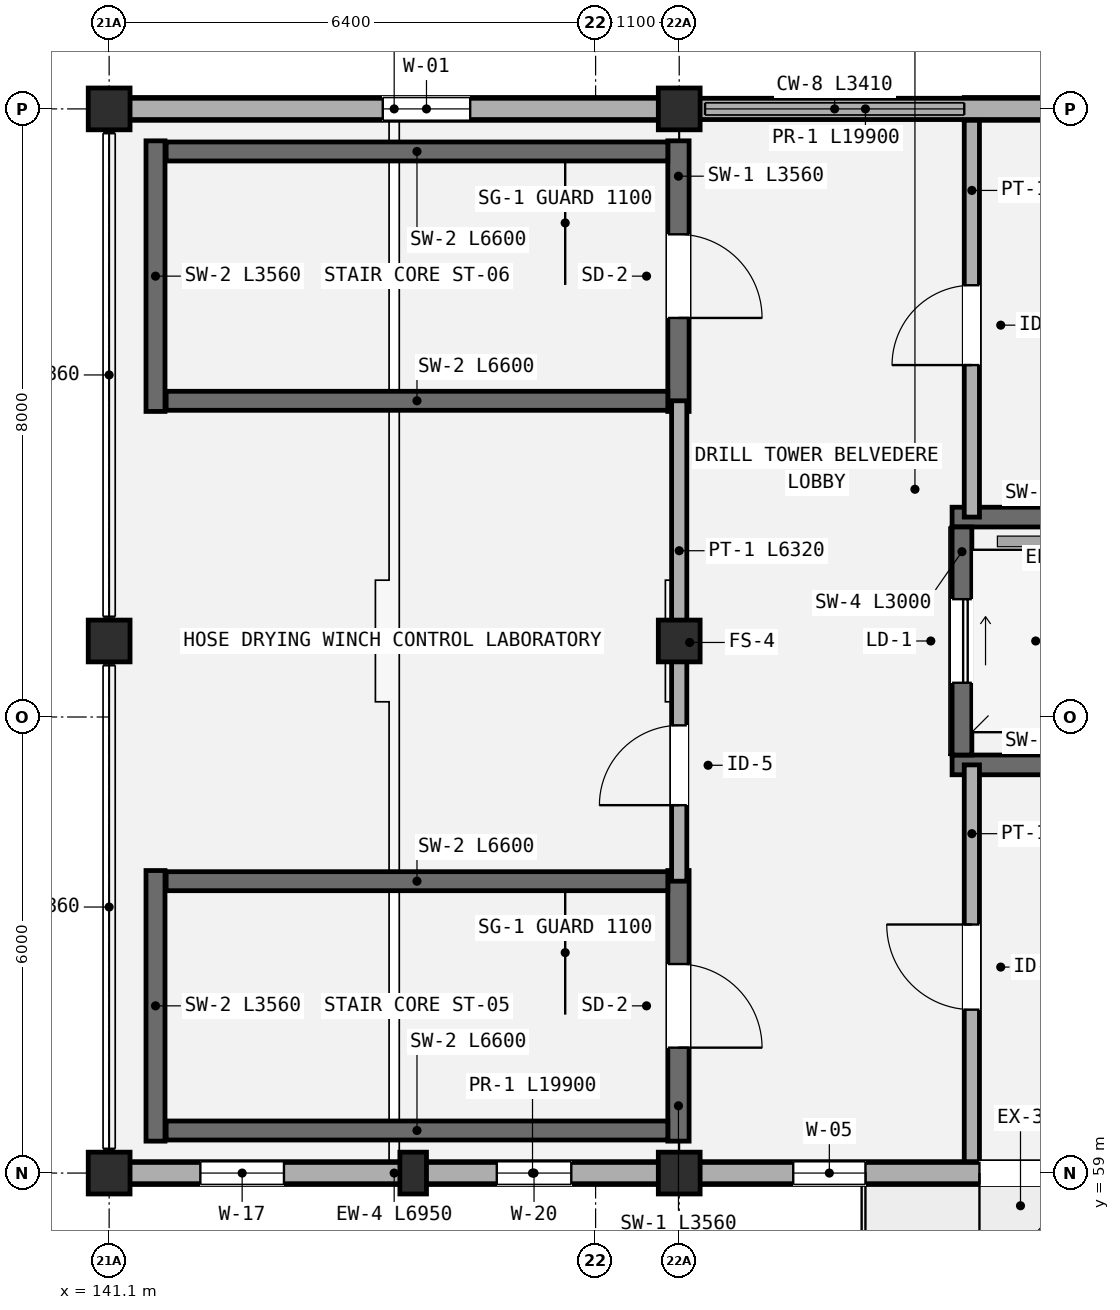
"""IFC4 building model, lengths in metres.
Left out: names, types, materials, properties, quantities, classifications, styles, units other than length and angle.
Written with IfcOpenShell. Run it as: python <this file> out.ifc"""

import sys

from ifc_helpers import new_model, si_unit, direction, frame, frame_2d, origin, origin_2d, place, context, subcontext, project, spatial, polyline, rectangle, outline, extrude, element, fill, save


model = new_model("IFC4")
c1 = context("Model", 3, precision=1e-05, world=origin(), true_north=direction((0.0, 1.0)))
c2 = subcontext(c1, "Body", "Model", "MODEL_VIEW")
j1 = project(units=[si_unit("LENGTHUNIT", "METRE"), si_unit("PLANEANGLEUNIT", "RADIAN")], contexts=[c1])
p1 = place(None, origin())
s1 = spatial("IfcSite", under=j1, at=p1, CompositionType="ELEMENT")
p2 = place(p1, origin())
s2 = spatial("IfcBuilding", under=s1, at=p2, CompositionType="ELEMENT")
p3 = place(p2, frame((0.0, 0.0, 22.05)))
s3 = spatial("IfcBuildingStorey", under=s2, at=p3, CompositionType="ELEMENT", Elevation=22.05)
for number, where, z_axis, x_axis in (
    (1, (141.1, 59.0, 0.0), (0.0, 0.0, 1.0), (1.0, 0.0, 0.0)),
    (2, (141.1, 66.0, 0.0), (0.0, 0.0, 1.0), (1.0, 0.0, 0.0)),
    (3, (141.1, 73.0, 0.0), (0.0, 0.0, 1.0), (1.0, 0.0, 0.0)),
    (4, (148.6, 59.0, 0.0), (0.0, 0.0, 1.0), (1.0, 0.0, 0.0)),
    (5, (148.6, 66.0, 0.0), (0.0, 0.0, 1.0), (1.0, 0.0, 0.0)),
    (6, (148.6, 73.0, 0.0), (0.0, 0.0, 1.0), (1.0, 0.0, 0.0)),
):
    element("IfcColumn", number, at=place(p3, frame(where, z_axis=z_axis, x_axis=x_axis)), inside=s3, PredefinedType="COLUMN", context=c2, shape_type="SweptSolid", body=[
        extrude(rectangle(XDim=0.55, YDim=0.55, at=origin_2d()), origin(), (0.0, 0.0, 1.0), 4.05),
    ])
p4 = place(p3, frame((145.1, 59.0, 0.0), z_axis=(0.0, 0.0, 1.0), x_axis=(1.0, 0.0, 0.0)))
e7 = element("IfcColumn", 7, at=p4, inside=s3, PredefinedType="PILASTER", context=c2, shape_type="SweptSolid", body=[
    extrude(rectangle(XDim=0.35, YDim=0.55, at=origin_2d()), origin(), (0.0, 0.0, 1.0), 4.05),
])
p5 = place(p3, frame((141.375, 59.0, 0.0), z_axis=(0.0, 0.0, 1.0), x_axis=(1.0, 0.0, 0.0)))
e8 = element("IfcWall", 8, at=p5, inside=s3, PredefinedType="STANDARD", context=c2, shape_type="SweptSolid", body=[
    extrude(rectangle(XDim=6.95, YDim=0.3, at=frame_2d((3.475, 0.0))), origin(), (0.0, 0.0, 1.0), 3.35),
])
p6 = place(p5, frame((0.925, 0.0, 0.75)))
e9 = element("IfcOpeningElement", 9, at=p6, cuts=e8, PredefinedType="OPENING", context=c2, shape_type="SweptSolid", body=[
    extrude(rectangle(XDim=1.1, YDim=1.35, at=frame_2d((0.55, 0.675))), frame((0.0, 0.16, 0.0), z_axis=(0.0, -1.0, 0.0), x_axis=(1.0, 0.0, 0.0)), (0.0, 0.0, 1.0), 0.32),
])
p7 = place(p5, frame((4.825, 0.0, 0.75)))
e10 = element("IfcOpeningElement", 10, at=p7, cuts=e8, PredefinedType="OPENING", context=c2, shape_type="SweptSolid", body=[
    extrude(rectangle(XDim=0.98, YDim=1.45, at=frame_2d((0.49, 0.725))), frame((0.0, 0.16, 0.0), z_axis=(0.0, -1.0, 0.0), x_axis=(1.0, 0.0, 0.0)), (0.0, 0.0, 1.0), 0.32),
])
p8 = place(p3, frame((148.875, 59.0, 0.0), z_axis=(0.0, 0.0, 1.0), x_axis=(1.0, 0.0, 0.0)))
e11 = element("IfcWall", 11, at=p8, inside=s3, PredefinedType="STANDARD", context=c2, shape_type="SweptSolid", body=[
    extrude(rectangle(XDim=11.85, YDim=0.3, at=frame_2d((5.925, 0.0))), origin(), (0.0, 0.0, 1.0), 3.35),
])
p9 = place(p8, frame((3.675, 0.0, 0.0)))
e12 = element("IfcOpeningElement", 12, at=p9, cuts=e11, PredefinedType="OPENING", context=c2, shape_type="SweptSolid", body=[
    extrude(rectangle(XDim=1.08, YDim=2.1, at=frame_2d((0.54, 1.05))), frame((0.0, 0.16, 0.0), z_axis=(0.0, -1.0, 0.0), x_axis=(1.0, 0.0, 0.0)), (0.0, 0.0, 1.0), 0.32),
])
p10 = place(p8, frame((1.225, 0.0, 0.75)))
e13 = element("IfcOpeningElement", 13, at=p10, cuts=e11, PredefinedType="OPENING", context=c2, shape_type="SweptSolid", body=[
    extrude(rectangle(XDim=0.95, YDim=1.35, at=frame_2d((0.475, 0.675))), frame((0.0, 0.16, 0.0), z_axis=(0.0, -1.0, 0.0), x_axis=(1.0, 0.0, 0.0)), (0.0, 0.0, 1.0), 0.32),
])
p11 = place(p8, frame((6.825, 0.0, 0.75)))
e14 = element("IfcOpeningElement", 14, at=p11, cuts=e11, PredefinedType="OPENING", context=c2, shape_type="SweptSolid", body=[
    extrude(rectangle(XDim=0.95, YDim=1.35, at=frame_2d((0.475, 0.675))), frame((0.0, 0.16, 0.0), z_axis=(0.0, -1.0, 0.0), x_axis=(1.0, 0.0, 0.0)), (0.0, 0.0, 1.0), 0.32),
])
p12 = place(p3, frame((160.725, 73.0, 0.0), z_axis=(0.0, 0.0, 1.0), x_axis=(-1.0, 0.0, 0.0)))
e15 = element("IfcWall", 15, at=p12, inside=s3, PredefinedType="STANDARD", context=c2, shape_type="SweptSolid", body=[
    extrude(rectangle(XDim=8.375, YDim=0.3, at=frame_2d((4.188, 0.0))), origin(), (0.0, 0.0, 1.0), 3.35),
])
p13 = place(p12, frame((1.375, 0.0, 0.75)))
e16 = element("IfcOpeningElement", 16, at=p13, cuts=e15, PredefinedType="OPENING", context=c2, shape_type="SweptSolid", body=[
    extrude(rectangle(XDim=0.88, YDim=1.5, at=frame_2d((0.44, 0.75))), frame((0.0, 0.16, 0.0), z_axis=(0.0, -1.0, 0.0), x_axis=(1.0, 0.0, 0.0)), (0.0, 0.0, 1.0), 0.32),
])
p14 = place(p12, frame((4.975, 0.0, 0.75)))
e17 = element("IfcOpeningElement", 17, at=p14, cuts=e15, PredefinedType="OPENING", context=c2, shape_type="SweptSolid", body=[
    extrude(rectangle(XDim=0.88, YDim=1.5, at=frame_2d((0.44, 0.75))), frame((0.0, 0.16, 0.0), z_axis=(0.0, -1.0, 0.0), x_axis=(1.0, 0.0, 0.0)), (0.0, 0.0, 1.0), 0.32),
])
p15 = place(p3, frame((148.325, 73.0, 0.0), z_axis=(0.0, 0.0, 1.0), x_axis=(-1.0, 0.0, 0.0)))
e18 = element("IfcWall", 18, at=p15, inside=s3, PredefinedType="STANDARD", context=c2, shape_type="SweptSolid", body=[
    extrude(rectangle(XDim=6.95, YDim=0.3, at=frame_2d((3.475, 0.0))), origin(), (0.0, 0.0, 1.0), 3.35),
])
p16 = place(p15, frame((2.475, 0.0, 0.75)))
e19 = element("IfcOpeningElement", 19, at=p16, cuts=e18, PredefinedType="OPENING", context=c2, shape_type="SweptSolid", body=[
    extrude(rectangle(XDim=1.15, YDim=1.45, at=frame_2d((0.575, 0.725))), frame((0.0, 0.16, 0.0), z_axis=(0.0, -1.0, 0.0), x_axis=(1.0, 0.0, 0.0)), (0.0, 0.0, 1.0), 0.32),
])
p17 = place(p3, frame((141.1, 59.0, 4.05), z_axis=(0.0, 0.0, 1.0), x_axis=(1.0, 0.0, 0.0)))
e20 = element("IfcWall", 20, at=p17, inside=s3, PredefinedType="PARAPET", context=c2, shape_type="SweptSolid", body=[
    extrude(outline(polyline([(0.0, 0.0), (7.5, 0.0), (7.5, 0.8), (6.668, 0.8), (6.667, 0.938), (5.834, 0.938), (5.833, 1.075), (5.001, 1.075), (5.0, 1.212), (4.168, 1.212), (4.167, 1.35), (3.334, 1.35), (3.333, 1.212), (2.501, 1.212), (2.5, 1.075), (1.668, 1.075), (1.667, 0.938), (0.834, 0.938), (0.833, 0.8), (0.0, 0.8), (0.0, 0.0)])), frame((0.0, 0.14, 0.0), z_axis=(0.0, -1.0, 0.0), x_axis=(1.0, 0.0, 0.0)), (0.0, 0.0, 1.0), 0.28),
])
p18 = place(p3, frame((148.6, 59.0, 4.05), z_axis=(0.0, 0.0, 1.0), x_axis=(1.0, 0.0, 0.0)))
e21 = element("IfcWall", 21, at=p18, inside=s3, PredefinedType="PARAPET", context=c2, shape_type="SweptSolid", body=[
    extrude(outline(polyline([(0.0, 0.0), (12.4, 0.0), (12.4, 0.8), (11.023, 0.8), (11.022, 0.987), (9.646, 0.987), (9.644, 1.175), (8.268, 1.175), (8.267, 1.362), (6.89, 1.362), (6.889, 1.55), (5.512, 1.55), (5.511, 1.362), (4.134, 1.362), (4.133, 1.175), (2.757, 1.175), (2.756, 0.987), (1.379, 0.987), (1.378, 0.8), (0.0, 0.8), (0.0, 0.0)])), frame((0.0, 0.14, 0.0), z_axis=(0.0, -1.0, 0.0), x_axis=(1.0, 0.0, 0.0)), (0.0, 0.0, 1.0), 0.28),
])
p19 = place(p3, frame((141.1, 73.0, 4.05), z_axis=(0.0, 0.0, 1.0), x_axis=(1.0, 0.0, 0.0)))
e22 = element("IfcWall", 22, at=p19, inside=s3, PredefinedType="PARAPET", context=c2, shape_type="SweptSolid", body=[
    extrude(outline(polyline([(0.0, 0.0), (7.5, 0.0), (7.5, 0.8), (6.668, 0.8), (6.667, 0.938), (5.834, 0.938), (5.833, 1.075), (5.001, 1.075), (5.0, 1.212), (4.168, 1.212), (4.167, 1.35), (3.334, 1.35), (3.333, 1.212), (2.501, 1.212), (2.5, 1.075), (1.668, 1.075), (1.667, 0.938), (0.834, 0.938), (0.833, 0.8), (0.0, 0.8), (0.0, 0.0)])), frame((0.0, 0.14, 0.0), z_axis=(0.0, -1.0, 0.0), x_axis=(1.0, 0.0, 0.0)), (0.0, 0.0, 1.0), 0.28),
])
p20 = place(p3, frame((148.6, 73.0, 4.05), z_axis=(0.0, 0.0, 1.0), x_axis=(1.0, 0.0, 0.0)))
e23 = element("IfcWall", 23, at=p20, inside=s3, PredefinedType="PARAPET", context=c2, shape_type="SweptSolid", body=[
    extrude(outline(polyline([(0.0, 0.0), (12.4, 0.0), (12.4, 0.8), (11.023, 0.8), (11.022, 0.987), (9.646, 0.987), (9.644, 1.175), (8.268, 1.175), (8.267, 1.362), (6.89, 1.362), (6.889, 1.55), (5.512, 1.55), (5.511, 1.362), (4.134, 1.362), (4.133, 1.175), (2.757, 1.175), (2.756, 0.987), (1.379, 0.987), (1.378, 0.8), (0.0, 0.8), (0.0, 0.0)])), frame((0.0, 0.14, 0.0), z_axis=(0.0, -1.0, 0.0), x_axis=(1.0, 0.0, 0.0)), (0.0, 0.0, 1.0), 0.28),
])
p21 = place(p3, frame((148.59, 62.98, 0.0), z_axis=(0.0, 0.0, 1.0), x_axis=(0.0, -1.0, 0.0)))
e24 = element("IfcWall", 24, at=p21, inside=s3, PredefinedType="SHEAR", context=c2, shape_type="SweptSolid", body=[
    extrude(rectangle(XDim=3.56, YDim=0.28, at=frame_2d((1.78, 0.0))), origin(), (0.0, 0.0, 1.0), 3.95),
])
p22 = place(p21, frame((1.23, 0.0, 0.0)))
e25 = element("IfcOpeningElement", 25, at=p22, cuts=e24, PredefinedType="OPENING", context=c2, shape_type="SweptSolid", body=[
    extrude(rectangle(XDim=1.1, YDim=2.15, at=frame_2d((0.55, 1.075))), frame((0.0, 0.15, 0.0), z_axis=(0.0, -1.0, 0.0), x_axis=(1.0, 0.0, 0.0)), (0.0, 0.0, 1.0), 0.3),
])
p23 = place(p3, frame((141.71, 59.42, 0.0), z_axis=(0.0, 0.0, 1.0), x_axis=(0.0, 1.0, 0.0)))
e26 = element("IfcWall", 26, at=p23, inside=s3, PredefinedType="SHEAR", context=c2, shape_type="SweptSolid", body=[
    extrude(rectangle(XDim=3.56, YDim=0.25, at=frame_2d((1.78, 0.0))), origin(), (0.0, 0.0, 1.0), 3.95),
])
for number, where, z_axis, x_axis in (
    (27, (148.45, 62.84, 0.0), (0.0, 0.0, 1.0), (-1.0, 0.0, 0.0)),
    (28, (141.85, 59.56, 0.0), (0.0, 0.0, 1.0), (1.0, 0.0, 0.0)),
):
    element("IfcWall", number, at=place(p3, frame(where, z_axis=z_axis, x_axis=x_axis)), inside=s3, PredefinedType="SHEAR", context=c2, shape_type="SweptSolid", body=[
        extrude(rectangle(XDim=6.6, YDim=0.25, at=frame_2d((3.3, 0.0))), origin(), (0.0, 0.0, 1.0), 3.95),
    ])
p24 = place(p3, frame((148.59, 72.58, 0.0), z_axis=(0.0, 0.0, 1.0), x_axis=(0.0, -1.0, 0.0)))
e29 = element("IfcWall", 29, at=p24, inside=s3, PredefinedType="SHEAR", context=c2, shape_type="SweptSolid", body=[
    extrude(rectangle(XDim=3.56, YDim=0.28, at=frame_2d((1.78, 0.0))), origin(), (0.0, 0.0, 1.0), 3.95),
])
p25 = place(p24, frame((1.23, 0.0, 0.0)))
e30 = element("IfcOpeningElement", 30, at=p25, cuts=e29, PredefinedType="OPENING", context=c2, shape_type="SweptSolid", body=[
    extrude(rectangle(XDim=1.1, YDim=2.15, at=frame_2d((0.55, 1.075))), frame((0.0, 0.15, 0.0), z_axis=(0.0, -1.0, 0.0), x_axis=(1.0, 0.0, 0.0)), (0.0, 0.0, 1.0), 0.3),
])
p26 = place(p3, frame((141.71, 69.02, 0.0), z_axis=(0.0, 0.0, 1.0), x_axis=(0.0, 1.0, 0.0)))
e31 = element("IfcWall", 31, at=p26, inside=s3, PredefinedType="SHEAR", context=c2, shape_type="SweptSolid", body=[
    extrude(rectangle(XDim=3.56, YDim=0.25, at=frame_2d((1.78, 0.0))), origin(), (0.0, 0.0, 1.0), 3.95),
])
for number, where, z_axis, x_axis in (
    (32, (148.45, 72.44, 0.0), (0.0, 0.0, 1.0), (-1.0, 0.0, 0.0)),
    (33, (141.85, 69.16, 0.0), (0.0, 0.0, 1.0), (1.0, 0.0, 0.0)),
):
    element("IfcWall", number, at=place(p3, frame(where, z_axis=z_axis, x_axis=x_axis)), inside=s3, PredefinedType="SHEAR", context=c2, shape_type="SweptSolid", body=[
        extrude(rectangle(XDim=6.6, YDim=0.25, at=frame_2d((3.3, 0.0))), origin(), (0.0, 0.0, 1.0), 3.95),
    ])
for number, where, z_axis, x_axis in (
    (34, (152.19, 64.37, 0.0), (0.0, 0.0, 1.0), (1.0, 0.0, 0.0)),
    (35, (155.11, 67.63, 0.0), (0.0, 0.0, 1.0), (-1.0, 0.0, 0.0)),
):
    element("IfcWall", number, at=place(p3, frame(where, z_axis=z_axis, x_axis=x_axis)), inside=s3, PredefinedType="SHEAR", context=c2, shape_type="SweptSolid", body=[
        extrude(rectangle(XDim=2.92, YDim=0.26, at=frame_2d((1.46, 0.0))), origin(), (0.0, 0.0, 1.0), 3.95),
    ])
p27 = place(p3, frame((152.32, 67.5, 0.0), z_axis=(0.0, 0.0, 1.0), x_axis=(0.0, -1.0, 0.0)))
e36 = element("IfcWall", 36, at=p27, inside=s3, PredefinedType="SHEAR", context=c2, shape_type="SweptSolid", body=[
    extrude(rectangle(XDim=3.0, YDim=0.26, at=frame_2d((1.5, 0.0))), origin(), (0.0, 0.0, 1.0), 3.95),
])
p28 = place(p27, frame((0.95, 0.0, 0.0)))
e37 = element("IfcOpeningElement", 37, at=p28, cuts=e36, PredefinedType="OPENING", context=c2, shape_type="SweptSolid", body=[
    extrude(rectangle(XDim=1.1, YDim=2.15, at=frame_2d((0.55, 1.075))), frame((0.0, 0.14, 0.0), z_axis=(0.0, -1.0, 0.0), x_axis=(1.0, 0.0, 0.0)), (0.0, 0.0, 1.0), 0.28),
])
p29 = place(p3, frame((148.6, 62.84, 0.0), z_axis=(0.0, 0.0, 1.0), x_axis=(0.0, 1.0, 0.0)))
e38 = element("IfcWall", 38, at=p29, inside=s3, PredefinedType="PARTITIONING", context=c2, shape_type="SweptSolid", body=[
    extrude(rectangle(XDim=6.32, YDim=0.2, at=frame_2d((3.16, 0.0))), origin(), (0.0, 0.0, 1.0), 3.3),
])
p30 = place(p29, frame((1.0, 0.0, 0.0)))
e39 = element("IfcOpeningElement", 39, at=p30, cuts=e38, PredefinedType="OPENING", context=c2, shape_type="SweptSolid", body=[
    extrude(rectangle(XDim=1.05, YDim=2.14, at=frame_2d((0.525, 1.07))), frame((0.0, 0.11, 0.0), z_axis=(0.0, -1.0, 0.0), x_axis=(1.0, 0.0, 0.0)), (0.0, 0.0, 1.0), 0.22),
])
p31 = place(p3, frame((152.45, 59.15, 0.0), z_axis=(0.0, 0.0, 1.0), x_axis=(0.0, 1.0, 0.0)))
e40 = element("IfcWall", 40, at=p31, inside=s3, PredefinedType="PARTITIONING", context=c2, shape_type="SweptSolid", body=[
    extrude(rectangle(XDim=5.22, YDim=0.2, at=frame_2d((2.61, 0.0))), origin(), (0.0, 0.0, 1.0), 3.3),
])
p32 = place(p31, frame((2.0, 0.0, 0.0)))
e41 = element("IfcOpeningElement", 41, at=p32, cuts=e40, PredefinedType="OPENING", context=c2, shape_type="SweptSolid", body=[
    extrude(rectangle(XDim=1.12, YDim=2.15, at=frame_2d((0.56, 1.075))), frame((0.0, 0.11, 0.0), z_axis=(0.0, -1.0, 0.0), x_axis=(1.0, 0.0, 0.0)), (0.0, 0.0, 1.0), 0.22),
])
p33 = place(p3, frame((152.45, 67.63, 0.0), z_axis=(0.0, 0.0, 1.0), x_axis=(0.0, 1.0, 0.0)))
e42 = element("IfcWall", 42, at=p33, inside=s3, PredefinedType="PARTITIONING", context=c2, shape_type="SweptSolid", body=[
    extrude(rectangle(XDim=5.22, YDim=0.2, at=frame_2d((2.61, 0.0))), origin(), (0.0, 0.0, 1.0), 3.3),
])
p34 = place(p33, frame((2.0, 0.0, 0.0)))
e43 = element("IfcOpeningElement", 43, at=p34, cuts=e42, PredefinedType="OPENING", context=c2, shape_type="SweptSolid", body=[
    extrude(rectangle(XDim=1.05, YDim=2.14, at=frame_2d((0.525, 1.07))), frame((0.0, 0.11, 0.0), z_axis=(0.0, -1.0, 0.0), x_axis=(1.0, 0.0, 0.0)), (0.0, 0.0, 1.0), 0.22),
])
p35 = place(p6, origin())
e44 = element("IfcWindow", 44, at=p35, inside=s3, PartitioningType="SINGLE_PANEL", PredefinedType="WINDOW", context=c2, shape_type="SweptSolid", body=[
    extrude(rectangle(XDim=1.1, YDim=1.35, at=frame_2d((0.55, 0.675))), frame((0.0, 0.03, 0.0), z_axis=(0.0, -1.0, 0.0), x_axis=(1.0, 0.0, 0.0)), (0.0, 0.0, 1.0), 0.06),
])
fill(e9, e44)
p36 = place(p7, origin())
e45 = element("IfcWindow", 45, at=p36, inside=s3, PartitioningType="SINGLE_PANEL", PredefinedType="WINDOW", context=c2, shape_type="SweptSolid", body=[
    extrude(rectangle(XDim=0.98, YDim=1.45, at=frame_2d((0.49, 0.725))), frame((0.0, 0.03, 0.0), z_axis=(0.0, -1.0, 0.0), x_axis=(1.0, 0.0, 0.0)), (0.0, 0.0, 1.0), 0.06),
])
fill(e10, e45)
p37 = place(p9, frame((1.08, 0.0, 0.0), z_axis=(0.0, 0.0, 1.0), x_axis=(-1.0, 0.0, 0.0)))
e46 = element("IfcDoor", 46, at=p37, inside=s3, OperationType="SINGLE_SWING_LEFT", PredefinedType="DOOR", context=c2, shape_type="SweptSolid", body=[
    extrude(rectangle(XDim=1.08, YDim=2.1, at=frame_2d((0.54, 1.05))), frame((0.0, 0.025, 0.0), z_axis=(0.0, -1.0, 0.0), x_axis=(1.0, 0.0, 0.0)), (0.0, 0.0, 1.0), 0.05),
])
fill(e12, e46)
p38 = place(p10, origin())
e47 = element("IfcWindow", 47, at=p38, inside=s3, PartitioningType="SINGLE_PANEL", PredefinedType="WINDOW", context=c2, shape_type="SweptSolid", body=[
    extrude(rectangle(XDim=0.95, YDim=1.35, at=frame_2d((0.475, 0.675))), frame((0.0, 0.03, 0.0), z_axis=(0.0, -1.0, 0.0), x_axis=(1.0, 0.0, 0.0)), (0.0, 0.0, 1.0), 0.06),
])
fill(e13, e47)
p39 = place(p16, origin())
e48 = element("IfcWindow", 48, at=p39, inside=s3, PartitioningType="SINGLE_PANEL", PredefinedType="WINDOW", context=c2, shape_type="SweptSolid", body=[
    extrude(rectangle(XDim=1.15, YDim=1.45, at=frame_2d((0.575, 0.725))), frame((0.0, 0.03, 0.0), z_axis=(0.0, -1.0, 0.0), x_axis=(1.0, 0.0, 0.0)), (0.0, 0.0, 1.0), 0.06),
])
fill(e19, e48)
p40 = place(p22, origin())
e49 = element("IfcDoor", 49, at=p40, inside=s3, OperationType="SINGLE_SWING_RIGHT", PredefinedType="DOOR", context=c2, shape_type="SweptSolid", body=[
    extrude(rectangle(XDim=1.1, YDim=2.15, at=frame_2d((0.55, 1.075))), frame((0.0, 0.025, 0.0), z_axis=(0.0, -1.0, 0.0), x_axis=(1.0, 0.0, 0.0)), (0.0, 0.0, 1.0), 0.05),
])
fill(e25, e49)
p41 = place(p25, origin())
e50 = element("IfcDoor", 50, at=p41, inside=s3, OperationType="SINGLE_SWING_RIGHT", PredefinedType="DOOR", context=c2, shape_type="SweptSolid", body=[
    extrude(rectangle(XDim=1.1, YDim=2.15, at=frame_2d((0.55, 1.075))), frame((0.0, 0.025, 0.0), z_axis=(0.0, -1.0, 0.0), x_axis=(1.0, 0.0, 0.0)), (0.0, 0.0, 1.0), 0.05),
])
fill(e30, e50)
p42 = place(p28, origin())
e51 = element("IfcDoor", 51, at=p42, inside=s3, OperationType="SLIDING_TO_LEFT", PredefinedType="DOOR", context=c2, shape_type="SweptSolid", body=[
    extrude(rectangle(XDim=1.1, YDim=2.15, at=frame_2d((0.55, 1.075))), frame((0.0, 0.025, 0.0), z_axis=(0.0, -1.0, 0.0), x_axis=(1.0, 0.0, 0.0)), (0.0, 0.0, 1.0), 0.05),
])
fill(e37, e51)
p43 = place(p30, origin())
e52 = element("IfcDoor", 52, at=p43, inside=s3, OperationType="SINGLE_SWING_LEFT", PredefinedType="DOOR", context=c2, shape_type="SweptSolid", body=[
    extrude(rectangle(XDim=1.05, YDim=2.14, at=frame_2d((0.525, 1.07))), frame((0.0, 0.025, 0.0), z_axis=(0.0, -1.0, 0.0), x_axis=(1.0, 0.0, 0.0)), (0.0, 0.0, 1.0), 0.05),
])
fill(e39, e52)
p44 = place(p32, origin())
e53 = element("IfcDoor", 53, at=p44, inside=s3, OperationType="SINGLE_SWING_RIGHT", PredefinedType="DOOR", context=c2, shape_type="SweptSolid", body=[
    extrude(rectangle(XDim=1.12, YDim=2.15, at=frame_2d((0.56, 1.075))), frame((0.0, 0.025, 0.0), z_axis=(0.0, -1.0, 0.0), x_axis=(1.0, 0.0, 0.0)), (0.0, 0.0, 1.0), 0.05),
])
fill(e41, e53)
p45 = place(p34, origin())
e54 = element("IfcDoor", 54, at=p45, inside=s3, OperationType="SINGLE_SWING_LEFT", PredefinedType="DOOR", context=c2, shape_type="SweptSolid", body=[
    extrude(rectangle(XDim=1.05, YDim=2.14, at=frame_2d((0.525, 1.07))), frame((0.0, 0.025, 0.0), z_axis=(0.0, -1.0, 0.0), x_axis=(1.0, 0.0, 0.0)), (0.0, 0.0, 1.0), 0.05),
])
fill(e43, e54)
save(model, sys.argv[1])
